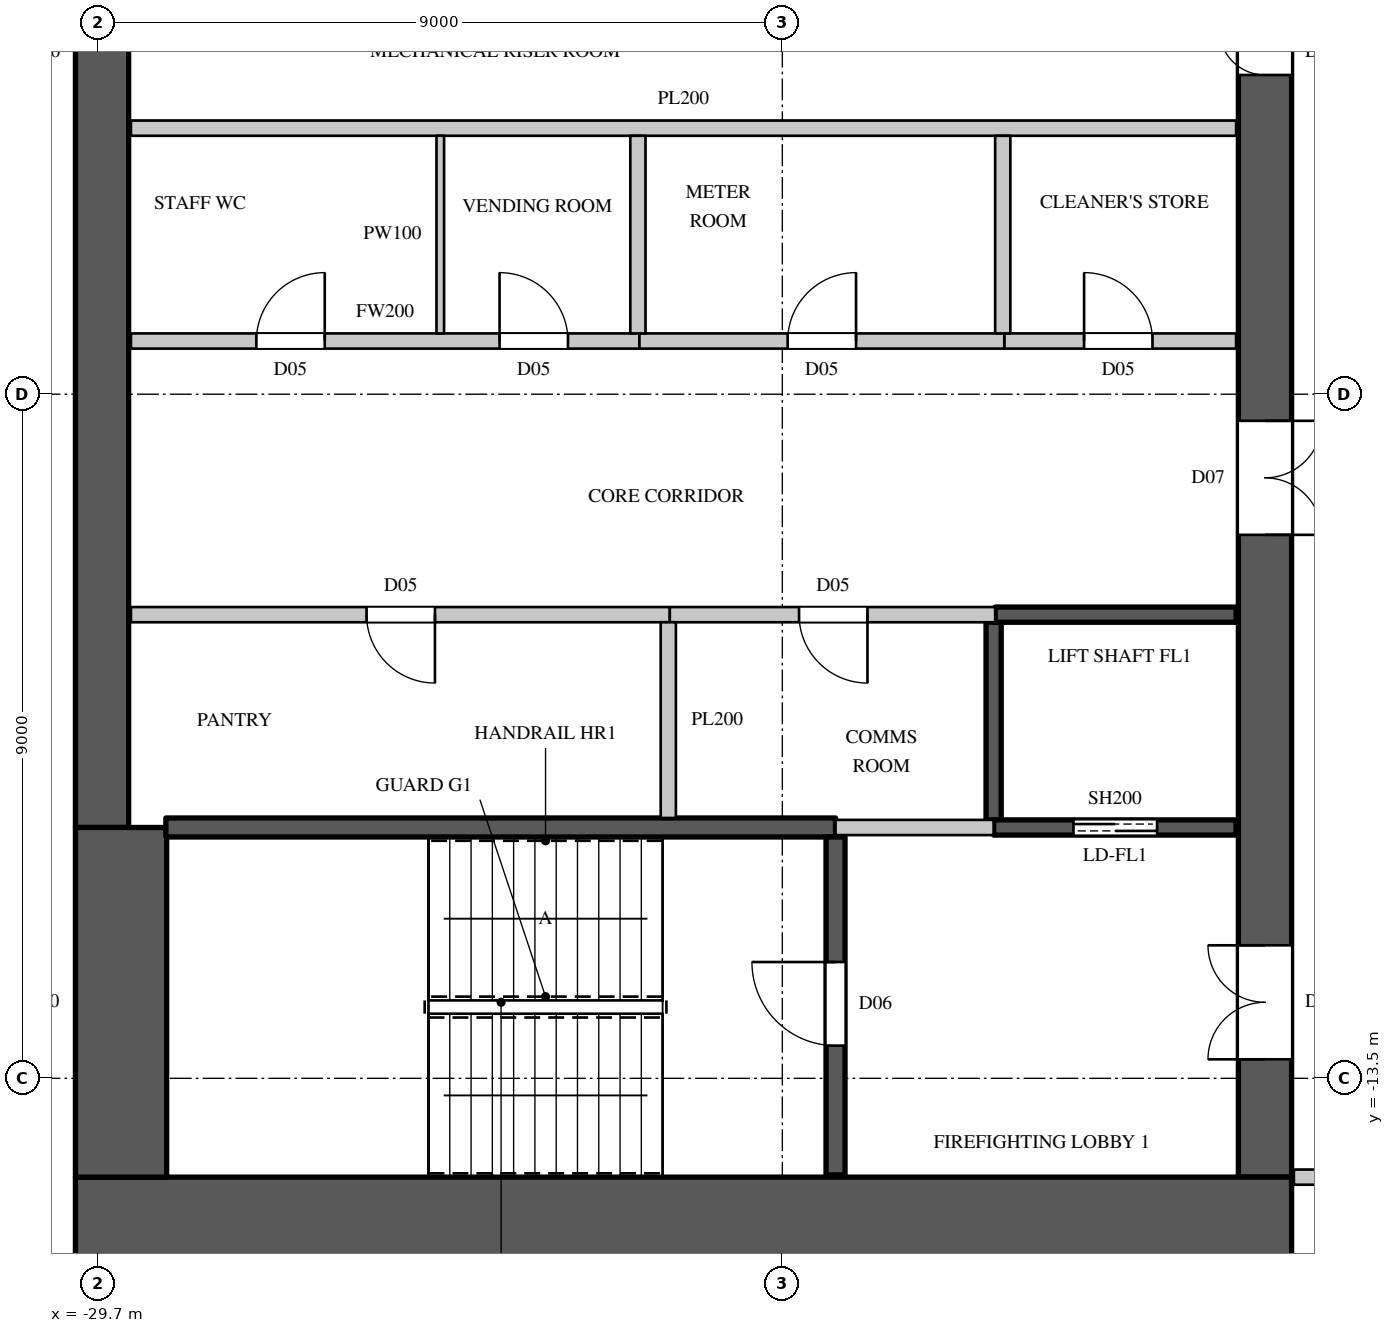
"""IFC4 building model, lengths in metres.
Left out: names, types, materials, properties, quantities, classifications, styles, units other than length and angle.
Written with IfcOpenShell. Run it as: python <this file> out.ifc"""

import sys

from ifc_helpers import new_model, si_unit, direction, frame, frame_2d, origin, place, context, subcontext, project, spatial, rectangle, extrude, element, fill, save


model = new_model("IFC4")
c1 = context("Model", 3, precision=1e-05, world=origin(), true_north=direction((0.0, 1.0)))
c2 = subcontext(c1, "Body", "Model", "MODEL_VIEW")
j1 = project(units=[si_unit("LENGTHUNIT", "METRE"), si_unit("PLANEANGLEUNIT", "RADIAN")], contexts=[c1])
p1 = place(None, origin())
s1 = spatial("IfcSite", under=j1, at=p1, CompositionType="ELEMENT")
p2 = place(p1, origin())
s2 = spatial("IfcBuilding", under=s1, at=p2, CompositionType="ELEMENT")
p3 = place(p2, frame((0.0, 0.0, 325.4)))
s3 = spatial("IfcBuildingStorey", under=s2, at=p3, CompositionType="ELEMENT", Elevation=325.4)
p4 = place(p3, frame((-30.0, -15.4, 0.0), z_axis=(0.0, 0.0, 1.0), x_axis=(1.0, 0.0, 0.0)))
e1 = element("IfcWall", 1, at=p4, inside=s3, PredefinedType="SHEAR", context=c2, shape_type="SweptSolid", body=[
    extrude(rectangle(XDim=16.0, YDim=1.2, at=frame_2d((8.0, 0.0))), origin(), (0.0, 0.0, 1.0), 4.1),
])
p5 = place(p3, frame((-14.35, -14.8, 0.0), z_axis=(0.0, 0.0, 1.0), x_axis=(0.0, 1.0, 0.0)))
e2 = element("IfcWall", 2, at=p5, inside=s3, PredefinedType="SHEAR", context=c2, shape_type="SweptSolid", body=[
    extrude(rectangle(XDim=29.6, YDim=0.7, at=frame_2d((14.8, 0.0))), origin(), (0.0, 0.0, 1.0), 4.1),
])
p6 = place(p5, frame((1.55, 0.0, 0.0)))
e3 = element("IfcOpeningElement", 3, at=p6, cuts=e2, PredefinedType="OPENING", context=c2, shape_type="SweptSolid", body=[
    extrude(rectangle(XDim=1.5, YDim=2.4, at=frame_2d((0.75, 1.2))), frame((0.0, 0.36, 0.0), z_axis=(0.0, -1.0, 0.0), x_axis=(1.0, 0.0, 0.0)), (0.0, 0.0, 1.0), 0.72),
])
p7 = place(p5, frame((26.55, 0.0, 0.0)))
e4 = element("IfcOpeningElement", 4, at=p7, cuts=e2, PredefinedType="OPENING", context=c2, shape_type="SweptSolid", body=[
    extrude(rectangle(XDim=1.5, YDim=2.4, at=frame_2d((0.75, 1.2))), frame((0.0, 0.36, 0.0), z_axis=(0.0, -1.0, 0.0), x_axis=(1.0, 0.0, 0.0)), (0.0, 0.0, 1.0), 0.72),
])
p8 = place(p5, frame((8.45, 0.0, 0.0)))
e5 = element("IfcOpeningElement", 5, at=p8, cuts=e2, PredefinedType="OPENING", context=c2, shape_type="SweptSolid", body=[
    extrude(rectangle(XDim=1.5, YDim=2.4, at=frame_2d((0.75, 1.2))), frame((0.0, 0.36, 0.0), z_axis=(0.0, -1.0, 0.0), x_axis=(1.0, 0.0, 0.0)), (0.0, 0.0, 1.0), 0.72),
])
p9 = place(p5, frame((19.65, 0.0, 0.0)))
e6 = element("IfcOpeningElement", 6, at=p9, cuts=e2, PredefinedType="OPENING", context=c2, shape_type="SweptSolid", body=[
    extrude(rectangle(XDim=1.5, YDim=2.4, at=frame_2d((0.75, 1.2))), frame((0.0, 0.36, 0.0), z_axis=(0.0, -1.0, 0.0), x_axis=(1.0, 0.0, 0.0)), (0.0, 0.0, 1.0), 0.72),
])
p10 = place(p5, frame((14.5, 0.0, 0.0)))
e7 = element("IfcOpeningElement", 7, at=p10, cuts=e2, PredefinedType="OPENING", context=c2, shape_type="SweptSolid", body=[
    extrude(rectangle(XDim=0.6, YDim=2.0, at=frame_2d((0.3, 1.0))), frame((0.0, 0.36, 0.0), z_axis=(0.0, -1.0, 0.0), x_axis=(1.0, 0.0, 0.0)), (0.0, 0.0, 1.0), 0.72),
])
p11 = place(p3, frame((-29.65, -10.2, 0.0), z_axis=(0.0, 0.0, 1.0), x_axis=(0.0, 1.0, 0.0)))
e8 = element("IfcWall", 8, at=p11, inside=s3, PredefinedType="SHEAR", context=c2, shape_type="SweptSolid", body=[
    extrude(rectangle(XDim=20.4, YDim=0.7, at=frame_2d((10.2, 0.0))), origin(), (0.0, 0.0, 1.0), 4.1),
])
p12 = place(p3, frame((-29.4, -14.8, 0.0), z_axis=(0.0, 0.0, 1.0), x_axis=(0.0, 1.0, 0.0)))
e9 = element("IfcWall", 9, at=p12, inside=s3, PredefinedType="SHEAR", context=c2, shape_type="SweptSolid", body=[
    extrude(rectangle(XDim=4.6, YDim=1.2, at=frame_2d((2.3, 0.0))), origin(), (0.0, 0.0, 1.0), 4.1),
])
p13 = place(p3, frame((-29.27, -7.4, 0.0), z_axis=(0.0, 0.0, 1.0), x_axis=(1.0, 0.0, 0.0)))
e10 = element("IfcWall", 10, at=p13, inside=s3, PredefinedType="PARTITIONING", context=c2, shape_type="SweptSolid", body=[
    extrude(rectangle(XDim=7.09, YDim=0.2, at=frame_2d((3.545, 0.0))), origin(), (0.0, 0.0, 1.0), 3.8),
])
p14 = place(p13, frame((3.1, 0.0, 0.0)))
e11 = element("IfcOpeningElement", 11, at=p14, cuts=e10, PredefinedType="OPENING", context=c2, shape_type="SweptSolid", body=[
    extrude(rectangle(XDim=0.9, YDim=2.2, at=frame_2d((0.45, 1.1))), frame((0.0, 0.11, 0.0), z_axis=(0.0, -1.0, 0.0), x_axis=(1.0, 0.0, 0.0)), (0.0, 0.0, 1.0), 0.22),
])
p15 = place(p3, frame((-29.27, -3.8, 0.0), z_axis=(0.0, 0.0, 1.0), x_axis=(1.0, 0.0, 0.0)))
e12 = element("IfcWall", 12, at=p15, inside=s3, PredefinedType="PARTITIONING", context=c2, shape_type="SweptSolid", body=[
    extrude(rectangle(XDim=6.69, YDim=0.2, at=frame_2d((3.345, 0.0))), origin(), (0.0, 0.0, 1.0), 3.8),
])
p16 = place(p15, frame((1.65, 0.0, 0.0)))
e13 = element("IfcOpeningElement", 13, at=p16, cuts=e12, PredefinedType="OPENING", context=c2, shape_type="SweptSolid", body=[
    extrude(rectangle(XDim=0.9, YDim=2.2, at=frame_2d((0.45, 1.1))), frame((0.0, 0.11, 0.0), z_axis=(0.0, -1.0, 0.0), x_axis=(1.0, 0.0, 0.0)), (0.0, 0.0, 1.0), 0.22),
])
p17 = place(p15, frame((4.85, 0.0, 0.0)))
e14 = element("IfcOpeningElement", 14, at=p17, cuts=e12, PredefinedType="OPENING", context=c2, shape_type="SweptSolid", body=[
    extrude(rectangle(XDim=0.9, YDim=2.2, at=frame_2d((0.45, 1.1))), frame((0.0, 0.11, 0.0), z_axis=(0.0, -1.0, 0.0), x_axis=(1.0, 0.0, 0.0)), (0.0, 0.0, 1.0), 0.22),
])
p18 = place(p3, frame((-17.78, -3.8, 0.0), z_axis=(0.0, 0.0, 1.0), x_axis=(1.0, 0.0, 0.0)))
e15 = element("IfcWall", 15, at=p18, inside=s3, PredefinedType="PARTITIONING", context=c2, shape_type="SweptSolid", body=[
    extrude(rectangle(XDim=3.05, YDim=0.2, at=frame_2d((1.525, 0.0))), origin(), (0.0, 0.0, 1.0), 3.8),
])
p19 = place(p18, frame((1.05, 0.0, 0.0)))
e16 = element("IfcOpeningElement", 16, at=p19, cuts=e15, PredefinedType="OPENING", context=c2, shape_type="SweptSolid", body=[
    extrude(rectangle(XDim=0.9, YDim=2.2, at=frame_2d((0.45, 1.1))), frame((0.0, 0.11, 0.0), z_axis=(0.0, -1.0, 0.0), x_axis=(1.0, 0.0, 0.0)), (0.0, 0.0, 1.0), 0.22),
])
p20 = place(p3, frame((-13.97, -14.8, 0.0), z_axis=(0.0, 0.0, 1.0), x_axis=(1.0, 0.0, 0.0)))
e17 = element("IfcWall", 17, at=p20, inside=s3, PredefinedType="PARTITIONING", context=c2, shape_type="SweptSolid", body=[
    extrude(rectangle(XDim=2.87, YDim=0.2, at=frame_2d((1.435, 0.0))), origin(), (0.0, 0.0, 1.0), 3.8),
])
p21 = place(p3, frame((-29.27, -1.0, 0.0), z_axis=(0.0, 0.0, 1.0), x_axis=(1.0, 0.0, 0.0)))
e18 = element("IfcWall", 18, at=p21, inside=s3, PredefinedType="PARTITIONING", context=c2, shape_type="SweptSolid", body=[
    extrude(rectangle(XDim=14.54, YDim=0.2, at=frame_2d((7.27, 0.0))), origin(), (0.0, 0.0, 1.0), 3.8),
])
p22 = place(p3, frame((-22.58, -3.8, 0.0), z_axis=(0.0, 0.0, 1.0), x_axis=(1.0, 0.0, 0.0)))
e19 = element("IfcWall", 19, at=p22, inside=s3, PredefinedType="PARTITIONING", context=c2, shape_type="SweptSolid", body=[
    extrude(rectangle(XDim=4.8, YDim=0.2, at=frame_2d((2.4, 0.0))), origin(), (0.0, 0.0, 1.0), 3.8),
])
p23 = place(p22, frame((1.95, 0.0, 0.0)))
e20 = element("IfcOpeningElement", 20, at=p23, cuts=e19, PredefinedType="OPENING", context=c2, shape_type="SweptSolid", body=[
    extrude(rectangle(XDim=0.9, YDim=2.2, at=frame_2d((0.45, 1.1))), frame((0.0, 0.11, 0.0), z_axis=(0.0, -1.0, 0.0), x_axis=(1.0, 0.0, 0.0)), (0.0, 0.0, 1.0), 0.22),
])
p24 = place(p3, frame((-22.6, -3.7, 0.0), z_axis=(0.0, 0.0, 1.0), x_axis=(0.0, 1.0, 0.0)))
e21 = element("IfcWall", 21, at=p24, inside=s3, PredefinedType="PARTITIONING", context=c2, shape_type="SweptSolid", body=[
    extrude(rectangle(XDim=2.6, YDim=0.2, at=frame_2d((1.3, 0.0))), origin(), (0.0, 0.0, 1.0), 3.8),
])
p25 = place(p3, frame((-22.18, -7.4, 0.0), z_axis=(0.0, 0.0, 1.0), x_axis=(1.0, 0.0, 0.0)))
e22 = element("IfcWall", 22, at=p25, inside=s3, PredefinedType="PARTITIONING", context=c2, shape_type="SweptSolid", body=[
    extrude(rectangle(XDim=4.28, YDim=0.2, at=frame_2d((2.14, 0.0))), origin(), (0.0, 0.0, 1.0), 3.8),
])
p26 = place(p25, frame((1.7, 0.0, 0.0)))
e23 = element("IfcOpeningElement", 23, at=p26, cuts=e22, PredefinedType="OPENING", context=c2, shape_type="SweptSolid", body=[
    extrude(rectangle(XDim=0.9, YDim=2.2, at=frame_2d((0.45, 1.1))), frame((0.0, 0.11, 0.0), z_axis=(0.0, -1.0, 0.0), x_axis=(1.0, 0.0, 0.0)), (0.0, 0.0, 1.0), 0.22),
])
p27 = place(p3, frame((-22.2, -10.075, 0.0), z_axis=(0.0, 0.0, 1.0), x_axis=(0.0, 1.0, 0.0)))
e24 = element("IfcWall", 24, at=p27, inside=s3, PredefinedType="PARTITIONING", context=c2, shape_type="SweptSolid", body=[
    extrude(rectangle(XDim=2.575, YDim=0.2, at=frame_2d((1.288, 0.0))), origin(), (0.0, 0.0, 1.0), 3.8),
])
p28 = place(p3, frame((-20.0, -10.2, 0.0), z_axis=(0.0, 0.0, 1.0), x_axis=(1.0, 0.0, 0.0)))
e25 = element("IfcWall", 25, at=p28, inside=s3, PredefinedType="PARTITIONING", context=c2, shape_type="SweptSolid", body=[
    extrude(rectangle(XDim=2.08, YDim=0.2, at=frame_2d((1.04, 0.0))), origin(), (0.0, 0.0, 1.0), 3.8),
])
p29 = place(p3, frame((-17.8, -3.7, 0.0), z_axis=(0.0, 0.0, 1.0), x_axis=(0.0, 1.0, 0.0)))
e26 = element("IfcWall", 26, at=p29, inside=s3, PredefinedType="PARTITIONING", context=c2, shape_type="SweptSolid", body=[
    extrude(rectangle(XDim=2.6, YDim=0.2, at=frame_2d((1.3, 0.0))), origin(), (0.0, 0.0, 1.0), 3.8),
])
p30 = place(p3, frame((-17.92, -10.1, 0.0), z_axis=(0.0, 0.0, 1.0), x_axis=(0.0, 1.0, 0.0)))
e27 = element("IfcWall", 27, at=p30, inside=s3, PredefinedType="SHEAR", context=c2, shape_type="SweptSolid", body=[
    extrude(rectangle(XDim=2.6, YDim=0.2, at=frame_2d((1.3, 0.0))), origin(), (0.0, 0.0, 1.0), 3.8),
])
p31 = place(p3, frame((-17.92, -10.2, 0.0), z_axis=(0.0, 0.0, 1.0), x_axis=(1.0, 0.0, 0.0)))
e28 = element("IfcWall", 28, at=p31, inside=s3, PredefinedType="SHEAR", context=c2, shape_type="SweptSolid", body=[
    extrude(rectangle(XDim=3.19, YDim=0.2, at=frame_2d((1.595, 0.0))), origin(), (0.0, 0.0, 1.0), 3.8),
])
p32 = place(p31, frame((1.05, 0.0, 0.0)))
e29 = element("IfcOpeningElement", 29, at=p32, cuts=e28, PredefinedType="OPENING", context=c2, shape_type="SweptSolid", body=[
    extrude(rectangle(XDim=1.1, YDim=2.2, at=frame_2d((0.55, 1.1))), frame((0.0, 0.11, 0.0), z_axis=(0.0, -1.0, 0.0), x_axis=(1.0, 0.0, 0.0)), (0.0, 0.0, 1.0), 0.22),
])
p33 = place(p3, frame((-17.9, -7.4, 0.0), z_axis=(0.0, 0.0, 1.0), x_axis=(1.0, 0.0, 0.0)))
e30 = element("IfcWall", 30, at=p33, inside=s3, PredefinedType="SHEAR", context=c2, shape_type="SweptSolid", body=[
    extrude(rectangle(XDim=3.17, YDim=0.2, at=frame_2d((1.585, 0.0))), origin(), (0.0, 0.0, 1.0), 3.8),
])
p34 = place(p3, frame((-28.81, -10.2, 0.0), z_axis=(0.0, 0.0, 1.0), x_axis=(1.0, 0.0, 0.0)))
e31 = element("IfcWall", 31, at=p34, inside=s3, PredefinedType="SHEAR", context=c2, shape_type="SweptSolid", body=[
    extrude(rectangle(XDim=8.81, YDim=0.25, at=frame_2d((4.405, 0.0))), origin(), (0.0, 0.0, 1.0), 3.8),
])
p35 = place(p3, frame((-20.0, -14.77, 0.0), z_axis=(0.0, 0.0, 1.0), x_axis=(0.0, 1.0, 0.0)))
e32 = element("IfcWall", 32, at=p35, inside=s3, PredefinedType="SHEAR", context=c2, shape_type="SweptSolid", body=[
    extrude(rectangle(XDim=4.445, YDim=0.25, at=frame_2d((2.223, 0.0))), origin(), (0.0, 0.0, 1.0), 3.8),
])
p36 = place(p35, frame((1.7, 0.0, 0.0)))
e33 = element("IfcOpeningElement", 33, at=p36, cuts=e32, PredefinedType="OPENING", context=c2, shape_type="SweptSolid", body=[
    extrude(rectangle(XDim=1.1, YDim=2.2, at=frame_2d((0.55, 1.1))), frame((0.0, 0.135, 0.0), z_axis=(0.0, -1.0, 0.0), x_axis=(1.0, 0.0, 0.0)), (0.0, 0.0, 1.0), 0.27),
])
p37 = place(p3, frame((-25.2, -3.7, 0.0), z_axis=(0.0, 0.0, 1.0), x_axis=(0.0, 1.0, 0.0)))
e34 = element("IfcWall", 34, at=p37, inside=s3, PredefinedType="PARTITIONING", context=c2, shape_type="SweptSolid", body=[
    extrude(rectangle(XDim=2.6, YDim=0.1, at=frame_2d((1.3, 0.0))), origin(), (0.0, 0.0, 1.0), 3.8),
])
p38 = place(p36, origin())
e35 = element("IfcDoor", 35, at=p38, inside=s3, OperationType="SINGLE_SWING_RIGHT", PredefinedType="DOOR", context=c2, shape_type="SweptSolid", body=[
    extrude(rectangle(XDim=1.1, YDim=2.2, at=frame_2d((0.55, 1.1))), frame((0.0, 0.025, 0.0), z_axis=(0.0, -1.0, 0.0), x_axis=(1.0, 0.0, 0.0)), (0.0, 0.0, 1.0), 0.05),
])
fill(e33, e35)
p39 = place(p14, origin())
e36 = element("IfcDoor", 36, at=p39, inside=s3, OperationType="SINGLE_SWING_LEFT", PredefinedType="DOOR", context=c2, shape_type="SweptSolid", body=[
    extrude(rectangle(XDim=0.9, YDim=2.2, at=frame_2d((0.45, 1.1))), frame((0.0, 0.025, 0.0), z_axis=(0.0, -1.0, 0.0), x_axis=(1.0, 0.0, 0.0)), (0.0, 0.0, 1.0), 0.05),
])
fill(e11, e36)
p40 = place(p26, origin())
e37 = element("IfcDoor", 37, at=p40, inside=s3, OperationType="SINGLE_SWING_LEFT", PredefinedType="DOOR", context=c2, shape_type="SweptSolid", body=[
    extrude(rectangle(XDim=0.9, YDim=2.2, at=frame_2d((0.45, 1.1))), frame((0.0, 0.025, 0.0), z_axis=(0.0, -1.0, 0.0), x_axis=(1.0, 0.0, 0.0)), (0.0, 0.0, 1.0), 0.05),
])
fill(e23, e37)
p41 = place(p16, origin())
e38 = element("IfcDoor", 38, at=p41, inside=s3, OperationType="SINGLE_SWING_RIGHT", PredefinedType="DOOR", context=c2, shape_type="SweptSolid", body=[
    extrude(rectangle(XDim=0.9, YDim=2.2, at=frame_2d((0.45, 1.1))), frame((0.0, 0.025, 0.0), z_axis=(0.0, -1.0, 0.0), x_axis=(1.0, 0.0, 0.0)), (0.0, 0.0, 1.0), 0.05),
])
fill(e13, e38)
p42 = place(p17, origin())
e39 = element("IfcDoor", 39, at=p42, inside=s3, OperationType="SINGLE_SWING_LEFT", PredefinedType="DOOR", context=c2, shape_type="SweptSolid", body=[
    extrude(rectangle(XDim=0.9, YDim=2.2, at=frame_2d((0.45, 1.1))), frame((0.0, 0.025, 0.0), z_axis=(0.0, -1.0, 0.0), x_axis=(1.0, 0.0, 0.0)), (0.0, 0.0, 1.0), 0.05),
])
fill(e14, e39)
p43 = place(p23, origin())
e40 = element("IfcDoor", 40, at=p43, inside=s3, OperationType="SINGLE_SWING_RIGHT", PredefinedType="DOOR", context=c2, shape_type="SweptSolid", body=[
    extrude(rectangle(XDim=0.9, YDim=2.2, at=frame_2d((0.45, 1.1))), frame((0.0, 0.025, 0.0), z_axis=(0.0, -1.0, 0.0), x_axis=(1.0, 0.0, 0.0)), (0.0, 0.0, 1.0), 0.05),
])
fill(e20, e40)
p44 = place(p19, origin())
e41 = element("IfcDoor", 41, at=p44, inside=s3, OperationType="SINGLE_SWING_LEFT", PredefinedType="DOOR", context=c2, shape_type="SweptSolid", body=[
    extrude(rectangle(XDim=0.9, YDim=2.2, at=frame_2d((0.45, 1.1))), frame((0.0, 0.025, 0.0), z_axis=(0.0, -1.0, 0.0), x_axis=(1.0, 0.0, 0.0)), (0.0, 0.0, 1.0), 0.05),
])
fill(e16, e41)
p45 = place(p32, origin())
e42 = element("IfcDoor", 42, at=p45, inside=s3, OperationType="DOUBLE_DOOR_SLIDING", PredefinedType="DOOR", context=c2, shape_type="SweptSolid", body=[
    extrude(rectangle(XDim=1.1, YDim=2.2, at=frame_2d((0.55, 1.1))), frame((0.0, 0.025, 0.0), z_axis=(0.0, -1.0, 0.0), x_axis=(1.0, 0.0, 0.0)), (0.0, 0.0, 1.0), 0.05),
])
fill(e29, e42)
p46 = place(p6, origin())
e43 = element("IfcDoor", 43, at=p46, inside=s3, OperationType="DOUBLE_DOOR_SINGLE_SWING", PredefinedType="DOOR", context=c2, shape_type="SweptSolid", body=[
    extrude(rectangle(XDim=1.5, YDim=2.4, at=frame_2d((0.75, 1.2))), frame((0.0, 0.345, 0.0), z_axis=(0.0, -1.0, 0.0), x_axis=(1.0, 0.0, 0.0)), (0.0, 0.0, 1.0), 0.05),
])
fill(e3, e43)
p47 = place(p8, origin())
e44 = element("IfcDoor", 44, at=p47, inside=s3, OperationType="DOUBLE_DOOR_SINGLE_SWING", PredefinedType="DOOR", context=c2, shape_type="SweptSolid", body=[
    extrude(rectangle(XDim=1.5, YDim=2.4, at=frame_2d((0.75, 1.2))), frame((0.0, -0.295, 0.0), z_axis=(0.0, -1.0, 0.0), x_axis=(1.0, 0.0, 0.0)), (0.0, 0.0, 1.0), 0.05),
])
fill(e5, e44)
p48 = place(p10, origin())
e45 = element("IfcDoor", 45, at=p48, inside=s3, OperationType="SINGLE_SWING_RIGHT", PredefinedType="DOOR", context=c2, shape_type="SweptSolid", body=[
    extrude(rectangle(XDim=0.6, YDim=2.0, at=frame_2d((0.3, 1.0))), frame((0.0, 0.345, 0.0), z_axis=(0.0, -1.0, 0.0), x_axis=(1.0, 0.0, 0.0)), (0.0, 0.0, 1.0), 0.05),
])
fill(e7, e45)
save(model, sys.argv[1])
